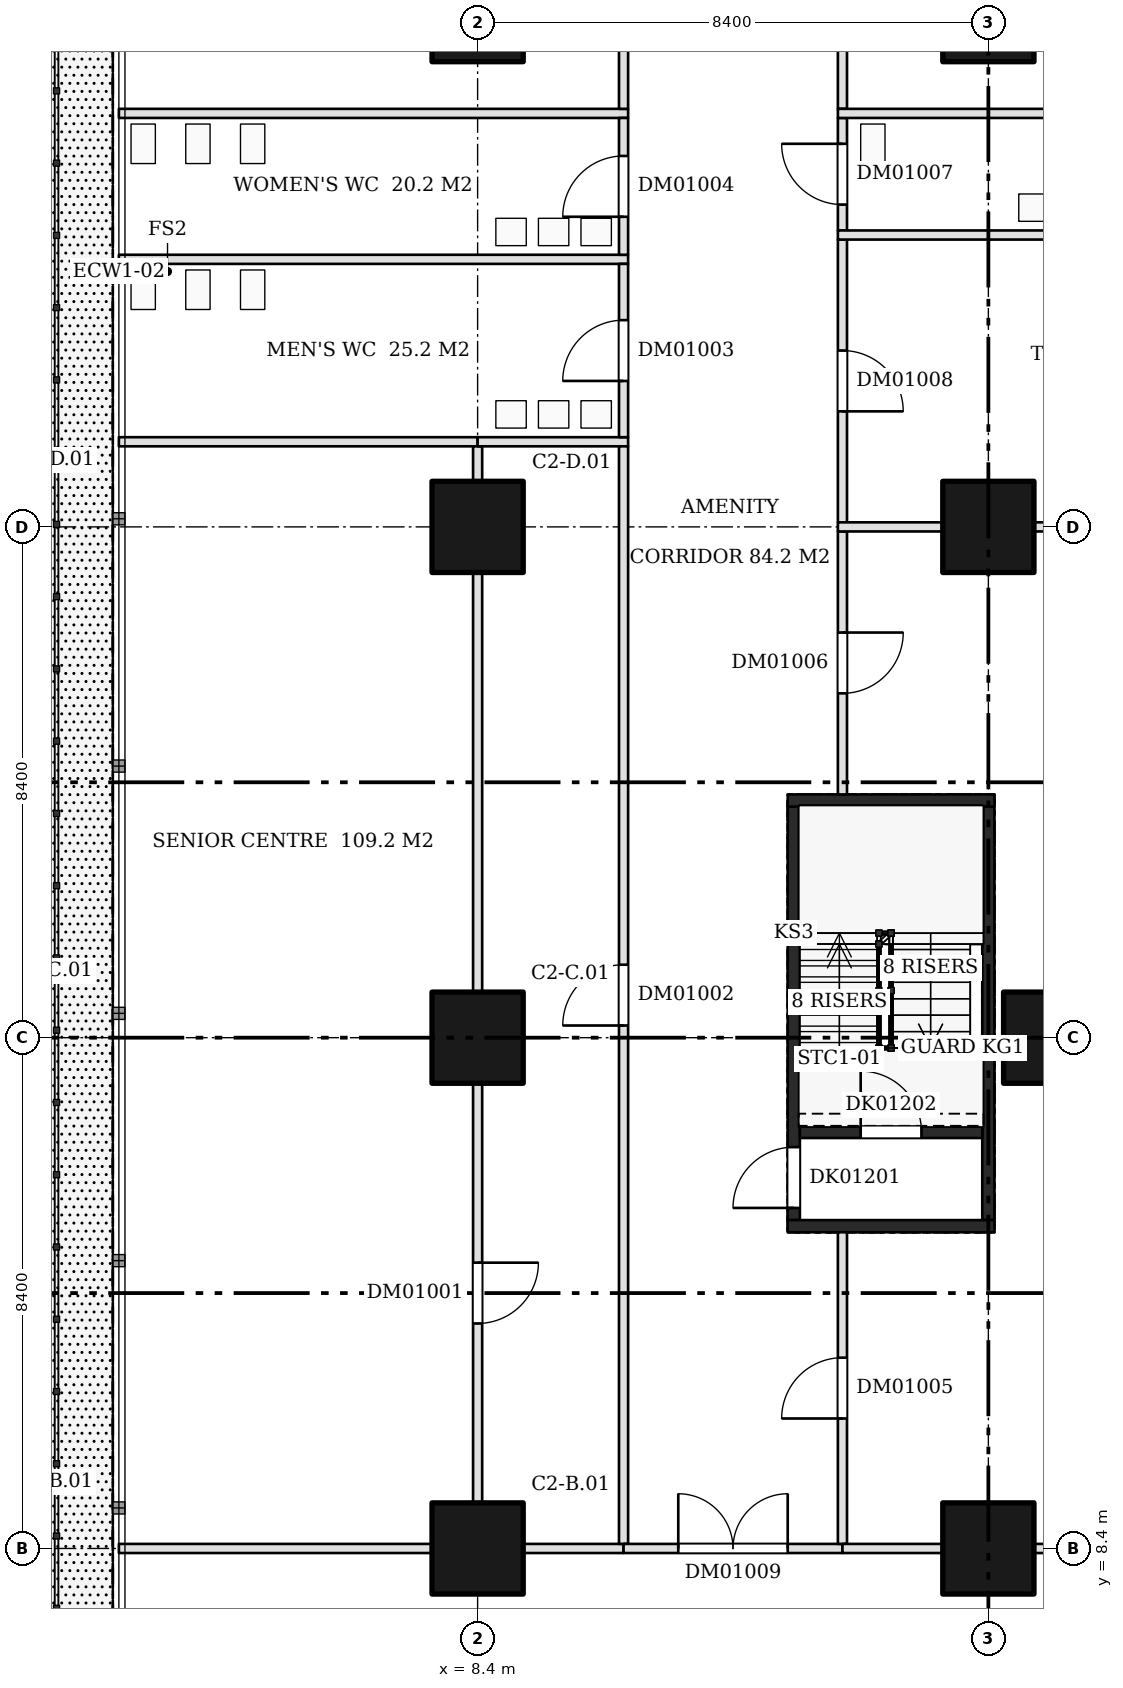
"""IFC4 building model, lengths in metres.
Left out: names, types, materials, properties, quantities, classifications, styles, units other than length and angle.
Written with IfcOpenShell. Run it as: python <this file> out.ifc"""

import sys

from ifc_helpers import new_model, si_unit, direction, frame, frame_2d, origin, origin_2d, place, context, subcontext, project, spatial, rectangle, extrude, element, fill, save


model = new_model("IFC4")
c1 = context("Model", 3, precision=1e-05, world=origin(), true_north=direction((0.0, 1.0)))
c2 = subcontext(c1, "Body", "Model", "MODEL_VIEW")
j1 = project(units=[si_unit("LENGTHUNIT", "METRE"), si_unit("PLANEANGLEUNIT", "RADIAN")], contexts=[c1])
p1 = place(None, origin())
s1 = spatial("IfcSite", under=j1, at=p1, CompositionType="ELEMENT")
p2 = place(p1, origin())
s2 = spatial("IfcBuilding", under=s1, at=p2, CompositionType="ELEMENT")
p3 = place(p2, frame((0.0, 0.0, 9.0)))
s3 = spatial("IfcBuildingStorey", under=s2, at=p3, CompositionType="ELEMENT", Elevation=9.0)
for number, where, z_axis, x_axis in (
    (1, (8.4, 8.4, 0.0), (0.0, 0.0, 1.0), (1.0, 0.0, 0.0)),
    (2, (8.4, 16.8, 0.0), (0.0, 0.0, 1.0), (1.0, 0.0, 0.0)),
    (3, (8.4, 25.2, 0.0), (0.0, 0.0, 1.0), (1.0, 0.0, 0.0)),
    (4, (8.4, 33.6, 0.0), (0.0, 0.0, 1.0), (1.0, 0.0, 0.0)),
    (5, (16.8, 8.4, 0.0), (0.0, 0.0, 1.0), (1.0, 0.0, 0.0)),
    (6, (17.8, 16.8, 0.0), (0.0, 0.0, 1.0), (1.0, 0.0, 0.0)),
    (7, (16.8, 25.2, 0.0), (0.0, 0.0, 1.0), (1.0, 0.0, 0.0)),
    (8, (16.8, 33.6, 0.0), (0.0, 0.0, 1.0), (1.0, 0.0, 0.0)),
):
    element("IfcColumn", number, at=place(p3, frame(where, z_axis=z_axis, x_axis=x_axis)), inside=s3, PredefinedType="COLUMN", context=c2, shape_type="SweptSolid", body=[
        extrude(rectangle(XDim=1.5, YDim=1.5, at=origin_2d()), origin(), (0.0, 0.0, 1.0), 4.95),
    ])
p4 = place(p3, frame((13.6, 13.8, 0.0), z_axis=(0.0, 0.0, 1.0), x_axis=(0.0, 1.0, 0.0)))
e9 = element("IfcWall", 9, at=p4, inside=s3, PredefinedType="SHEAR", context=c2, shape_type="SweptSolid", body=[
    extrude(rectangle(XDim=6.8, YDim=0.2, at=frame_2d((3.4, 0.0))), origin(), (0.0, 0.0, 1.0), 4.98),
])
p5 = place(p4, frame((0.2, 0.0, 0.0)))
e10 = element("IfcOpeningElement", 10, at=p5, cuts=e9, PredefinedType="OPENING", context=c2, shape_type="SweptSolid", body=[
    extrude(rectangle(XDim=1.0, YDim=2.1, at=frame_2d((0.5, 1.05))), frame((0.0, 0.11, 0.0), z_axis=(0.0, -1.0, 0.0), x_axis=(1.0, 0.0, 0.0)), (0.0, 0.0, 1.0), 0.22),
])
p6 = place(p3, frame((16.8, 13.8, 0.0), z_axis=(0.0, 0.0, 1.0), x_axis=(0.0, 1.0, 0.0)))
e11 = element("IfcWall", 11, at=p6, inside=s3, PredefinedType="SHEAR", context=c2, shape_type="SweptSolid", body=[
    extrude(rectangle(XDim=6.8, YDim=0.2, at=frame_2d((3.4, 0.0))), origin(), (0.0, 0.0, 1.0), 4.98),
])
for number, where, z_axis, x_axis in (
    (12, (13.5, 13.7, 0.0), (0.0, 0.0, 1.0), (1.0, 0.0, 0.0)),
    (13, (13.5, 20.7, 0.0), (0.0, 0.0, 1.0), (1.0, 0.0, 0.0)),
):
    element("IfcWall", number, at=place(p3, frame(where, z_axis=z_axis, x_axis=x_axis)), inside=s3, PredefinedType="SHEAR", context=c2, shape_type="SweptSolid", body=[
        extrude(rectangle(XDim=3.4, YDim=0.2, at=frame_2d((1.7, 0.0))), origin(), (0.0, 0.0, 1.0), 4.98),
    ])
p7 = place(p3, frame((13.7, 15.25, 0.0), z_axis=(0.0, 0.0, 1.0), x_axis=(1.0, 0.0, 0.0)))
e14 = element("IfcWall", 14, at=p7, inside=s3, PredefinedType="SHEAR", context=c2, shape_type="SweptSolid", body=[
    extrude(rectangle(XDim=3.0, YDim=0.2, at=frame_2d((1.5, 0.0))), origin(), (0.0, 0.0, 1.0), 4.98),
])
p8 = place(p7, frame((1.0, 0.0, 0.0)))
e15 = element("IfcOpeningElement", 15, at=p8, cuts=e14, PredefinedType="OPENING", context=c2, shape_type="SweptSolid", body=[
    extrude(rectangle(XDim=1.0, YDim=2.1, at=frame_2d((0.5, 1.05))), frame((0.0, 0.11, 0.0), z_axis=(0.0, -1.0, 0.0), x_axis=(1.0, 0.0, 0.0)), (0.0, 0.0, 1.0), 0.22),
])
p9 = place(p3, frame((2.5, 8.4, 0.0), z_axis=(0.0, 0.0, 1.0), x_axis=(1.0, 0.0, 0.0)))
e16 = element("IfcWall", 16, at=p9, inside=s3, PredefinedType="PARTITIONING", context=c2, shape_type="SweptSolid", body=[
    extrude(rectangle(XDim=5.15, YDim=0.15, at=frame_2d((2.575, 0.0))), origin(), (0.0, 0.0, 1.0), 4.95),
])
p10 = place(p3, frame((2.5, 26.6, 0.0), z_axis=(0.0, 0.0, 1.0), x_axis=(1.0, 0.0, 0.0)))
e17 = element("IfcWall", 17, at=p10, inside=s3, PredefinedType="PARTITIONING", context=c2, shape_type="SweptSolid", body=[
    extrude(rectangle(XDim=5.9, YDim=0.15, at=frame_2d((2.95, 0.0))), origin(), (0.0, 0.0, 1.0), 4.95),
])
for number, where, z_axis, x_axis in (
    (18, (2.5, 29.6, 0.0), (0.0, 0.0, 1.0), (1.0, 0.0, 0.0)),
    (19, (2.5, 32.0, 0.0), (0.0, 0.0, 1.0), (1.0, 0.0, 0.0)),
):
    element("IfcWall", number, at=place(p3, frame(where, z_axis=z_axis, x_axis=x_axis)), inside=s3, PredefinedType="PARTITIONING", context=c2, shape_type="SweptSolid", body=[
        extrude(rectangle(XDim=8.375, YDim=0.15, at=frame_2d((4.188, 0.0))), origin(), (0.0, 0.0, 1.0), 4.95),
    ])
p11 = place(p3, frame((8.4, 9.15, 0.0), z_axis=(0.0, 0.0, 1.0), x_axis=(0.0, 1.0, 0.0)))
e20 = element("IfcWall", 20, at=p11, inside=s3, PredefinedType="PARTITIONING", context=c2, shape_type="SweptSolid", body=[
    extrude(rectangle(XDim=6.9, YDim=0.15, at=frame_2d((3.45, 0.0))), origin(), (0.0, 0.0, 1.0), 4.95),
])
p12 = place(p11, frame((2.95, 0.0, 0.0)))
e21 = element("IfcOpeningElement", 21, at=p12, cuts=e20, PredefinedType="OPENING", context=c2, shape_type="SweptSolid", body=[
    extrude(rectangle(XDim=1.0, YDim=2.1, at=frame_2d((0.5, 1.05))), frame((0.0, 0.085, 0.0), z_axis=(0.0, -1.0, 0.0), x_axis=(1.0, 0.0, 0.0)), (0.0, 0.0, 1.0), 0.17),
])
p13 = place(p3, frame((8.4, 17.55, 0.0), z_axis=(0.0, 0.0, 1.0), x_axis=(0.0, 1.0, 0.0)))
e22 = element("IfcWall", 22, at=p13, inside=s3, PredefinedType="PARTITIONING", context=c2, shape_type="SweptSolid", body=[
    extrude(rectangle(XDim=6.9, YDim=0.15, at=frame_2d((3.45, 0.0))), origin(), (0.0, 0.0, 1.0), 4.95),
])
p14 = place(p3, frame((8.4, 25.95, 0.0), z_axis=(0.0, 0.0, 1.0), x_axis=(0.0, 1.0, 0.0)))
e23 = element("IfcWall", 23, at=p14, inside=s3, PredefinedType="PARTITIONING", context=c2, shape_type="SweptSolid", body=[
    extrude(rectangle(XDim=0.575, YDim=0.15, at=frame_2d((0.288, 0.0))), origin(), (0.0, 0.0, 1.0), 4.95),
])
p15 = place(p3, frame((9.15, 8.4, 0.0), z_axis=(0.0, 0.0, 1.0), x_axis=(1.0, 0.0, 0.0)))
e24 = element("IfcWall", 24, at=p15, inside=s3, PredefinedType="PARTITIONING", context=c2, shape_type="SweptSolid", body=[
    extrude(rectangle(XDim=1.65, YDim=0.15, at=frame_2d((0.825, 0.0))), origin(), (0.0, 0.0, 1.0), 4.95),
])
p16 = place(p3, frame((8.4, 26.6, 0.0), z_axis=(0.0, 0.0, 1.0), x_axis=(1.0, 0.0, 0.0)))
e25 = element("IfcWall", 25, at=p16, inside=s3, PredefinedType="PARTITIONING", context=c2, shape_type="SweptSolid", body=[
    extrude(rectangle(XDim=2.475, YDim=0.15, at=frame_2d((1.238, 0.0))), origin(), (0.0, 0.0, 1.0), 4.95),
])
p17 = place(p3, frame((10.8, 8.475, 0.0), z_axis=(0.0, 0.0, 1.0), x_axis=(0.0, 1.0, 0.0)))
e26 = element("IfcWall", 26, at=p17, inside=s3, PredefinedType="PARTITIONING", context=c2, shape_type="SweptSolid", body=[
    extrude(rectangle(XDim=18.05, YDim=0.15, at=frame_2d((9.025, 0.0))), origin(), (0.0, 0.0, 1.0), 4.95),
])
p18 = place(p17, frame((8.525, 0.0, 0.0)))
e27 = element("IfcOpeningElement", 27, at=p18, cuts=e26, PredefinedType="OPENING", context=c2, shape_type="SweptSolid", body=[
    extrude(rectangle(XDim=1.0, YDim=2.1, at=frame_2d((0.5, 1.05))), frame((0.0, 0.085, 0.0), z_axis=(0.0, -1.0, 0.0), x_axis=(1.0, 0.0, 0.0)), (0.0, 0.0, 1.0), 0.17),
])
p19 = place(p3, frame((10.8, 8.4, 0.0), z_axis=(0.0, 0.0, 1.0), x_axis=(1.0, 0.0, 0.0)))
e28 = element("IfcWall", 28, at=p19, inside=s3, PredefinedType="PARTITIONING", context=c2, shape_type="SweptSolid", body=[
    extrude(rectangle(XDim=3.6, YDim=0.15, at=frame_2d((1.8, 0.0))), origin(), (0.0, 0.0, 1.0), 4.95),
])
p20 = place(p19, frame((0.9, 0.0, 0.0)))
e29 = element("IfcOpeningElement", 29, at=p20, cuts=e28, PredefinedType="OPENING", context=c2, shape_type="SweptSolid", body=[
    extrude(rectangle(XDim=1.8, YDim=2.1, at=frame_2d((0.9, 1.05))), frame((0.0, 0.085, 0.0), z_axis=(0.0, -1.0, 0.0), x_axis=(1.0, 0.0, 0.0)), (0.0, 0.0, 1.0), 0.17),
])
p21 = place(p3, frame((10.8, 26.675, 0.0), z_axis=(0.0, 0.0, 1.0), x_axis=(0.0, 1.0, 0.0)))
e30 = element("IfcWall", 30, at=p21, inside=s3, PredefinedType="PARTITIONING", context=c2, shape_type="SweptSolid", body=[
    extrude(rectangle(XDim=2.85, YDim=0.15, at=frame_2d((1.425, 0.0))), origin(), (0.0, 0.0, 1.0), 4.95),
])
p22 = place(p21, frame((0.925, 0.0, 0.0)))
e31 = element("IfcOpeningElement", 31, at=p22, cuts=e30, PredefinedType="OPENING", context=c2, shape_type="SweptSolid", body=[
    extrude(rectangle(XDim=1.0, YDim=2.1, at=frame_2d((0.5, 1.05))), frame((0.0, 0.085, 0.0), z_axis=(0.0, -1.0, 0.0), x_axis=(1.0, 0.0, 0.0)), (0.0, 0.0, 1.0), 0.17),
])
p23 = place(p3, frame((10.8, 29.675, 0.0), z_axis=(0.0, 0.0, 1.0), x_axis=(0.0, 1.0, 0.0)))
e32 = element("IfcWall", 32, at=p23, inside=s3, PredefinedType="PARTITIONING", context=c2, shape_type="SweptSolid", body=[
    extrude(rectangle(XDim=2.25, YDim=0.15, at=frame_2d((1.125, 0.0))), origin(), (0.0, 0.0, 1.0), 4.95),
])
p24 = place(p23, frame((0.625, 0.0, 0.0)))
e33 = element("IfcOpeningElement", 33, at=p24, cuts=e32, PredefinedType="OPENING", context=c2, shape_type="SweptSolid", body=[
    extrude(rectangle(XDim=1.0, YDim=2.1, at=frame_2d((0.5, 1.05))), frame((0.0, 0.085, 0.0), z_axis=(0.0, -1.0, 0.0), x_axis=(1.0, 0.0, 0.0)), (0.0, 0.0, 1.0), 0.17),
])
p25 = place(p3, frame((10.8, 32.075, 0.0), z_axis=(0.0, 0.0, 1.0), x_axis=(0.0, 1.0, 0.0)))
e34 = element("IfcWall", 34, at=p25, inside=s3, PredefinedType="PARTITIONING", context=c2, shape_type="SweptSolid", body=[
    extrude(rectangle(XDim=1.45, YDim=0.15, at=frame_2d((0.725, 0.0))), origin(), (0.0, 0.0, 1.0), 4.95),
])
p26 = place(p3, frame((14.4, 8.475, 0.0), z_axis=(0.0, 0.0, 1.0), x_axis=(0.0, 1.0, 0.0)))
e35 = element("IfcWall", 35, at=p26, inside=s3, PredefinedType="PARTITIONING", context=c2, shape_type="SweptSolid", body=[
    extrude(rectangle(XDim=5.125, YDim=0.15, at=frame_2d((2.562, 0.0))), origin(), (0.0, 0.0, 1.0), 4.95),
])
p27 = place(p26, frame((2.062, 0.0, 0.0)))
e36 = element("IfcOpeningElement", 36, at=p27, cuts=e35, PredefinedType="OPENING", context=c2, shape_type="SweptSolid", body=[
    extrude(rectangle(XDim=1.0, YDim=2.1, at=frame_2d((0.5, 1.05))), frame((0.0, 0.085, 0.0), z_axis=(0.0, -1.0, 0.0), x_axis=(1.0, 0.0, 0.0)), (0.0, 0.0, 1.0), 0.17),
])
p28 = place(p3, frame((14.4, 8.4, 0.0), z_axis=(0.0, 0.0, 1.0), x_axis=(1.0, 0.0, 0.0)))
e37 = element("IfcWall", 37, at=p28, inside=s3, PredefinedType="PARTITIONING", context=c2, shape_type="SweptSolid", body=[
    extrude(rectangle(XDim=1.65, YDim=0.15, at=frame_2d((0.825, 0.0))), origin(), (0.0, 0.0, 1.0), 4.95),
])
p29 = place(p3, frame((17.55, 8.4, 0.0), z_axis=(0.0, 0.0, 1.0), x_axis=(1.0, 0.0, 0.0)))
e38 = element("IfcWall", 38, at=p29, inside=s3, PredefinedType="PARTITIONING", context=c2, shape_type="SweptSolid", body=[
    extrude(rectangle(XDim=7.55, YDim=0.15, at=frame_2d((3.775, 0.0))), origin(), (0.0, 0.0, 1.0), 4.95),
])
p30 = place(p3, frame((14.4, 20.8, 0.0), z_axis=(0.0, 0.0, 1.0), x_axis=(0.0, 1.0, 0.0)))
e39 = element("IfcWall", 39, at=p30, inside=s3, PredefinedType="PARTITIONING", context=c2, shape_type="SweptSolid", body=[
    extrude(rectangle(XDim=4.325, YDim=0.15, at=frame_2d((2.163, 0.0))), origin(), (0.0, 0.0, 1.0), 4.95),
])
p31 = place(p30, frame((1.663, 0.0, 0.0)))
e40 = element("IfcOpeningElement", 40, at=p31, cuts=e39, PredefinedType="OPENING", context=c2, shape_type="SweptSolid", body=[
    extrude(rectangle(XDim=1.0, YDim=2.1, at=frame_2d((0.5, 1.05))), frame((0.0, 0.085, 0.0), z_axis=(0.0, -1.0, 0.0), x_axis=(1.0, 0.0, 0.0)), (0.0, 0.0, 1.0), 0.17),
])
p32 = place(p3, frame((14.4, 25.275, 0.0), z_axis=(0.0, 0.0, 1.0), x_axis=(0.0, 1.0, 0.0)))
e41 = element("IfcWall", 41, at=p32, inside=s3, PredefinedType="PARTITIONING", context=c2, shape_type="SweptSolid", body=[
    extrude(rectangle(XDim=4.65, YDim=0.15, at=frame_2d((2.325, 0.0))), origin(), (0.0, 0.0, 1.0), 4.95),
])
p33 = place(p32, frame((1.825, 0.0, 0.0)))
e42 = element("IfcOpeningElement", 42, at=p33, cuts=e41, PredefinedType="OPENING", context=c2, shape_type="SweptSolid", body=[
    extrude(rectangle(XDim=1.0, YDim=2.1, at=frame_2d((0.5, 1.05))), frame((0.0, 0.085, 0.0), z_axis=(0.0, -1.0, 0.0), x_axis=(1.0, 0.0, 0.0)), (0.0, 0.0, 1.0), 0.17),
])
p34 = place(p3, frame((14.325, 25.2, 0.0), z_axis=(0.0, 0.0, 1.0), x_axis=(1.0, 0.0, 0.0)))
e43 = element("IfcWall", 43, at=p34, inside=s3, PredefinedType="PARTITIONING", context=c2, shape_type="SweptSolid", body=[
    extrude(rectangle(XDim=1.725, YDim=0.15, at=frame_2d((0.863, 0.0))), origin(), (0.0, 0.0, 1.0), 4.95),
])
p35 = place(p3, frame((17.55, 25.2, 0.0), z_axis=(0.0, 0.0, 1.0), x_axis=(1.0, 0.0, 0.0)))
e44 = element("IfcWall", 44, at=p35, inside=s3, PredefinedType="PARTITIONING", context=c2, shape_type="SweptSolid", body=[
    extrude(rectangle(XDim=5.15, YDim=0.15, at=frame_2d((2.575, 0.0))), origin(), (0.0, 0.0, 1.0), 4.95),
])
p36 = place(p3, frame((14.4, 30.075, 0.0), z_axis=(0.0, 0.0, 1.0), x_axis=(0.0, 1.0, 0.0)))
e45 = element("IfcWall", 45, at=p36, inside=s3, PredefinedType="PARTITIONING", context=c2, shape_type="SweptSolid", body=[
    extrude(rectangle(XDim=1.85, YDim=0.15, at=frame_2d((0.925, 0.0))), origin(), (0.0, 0.0, 1.0), 4.95),
])
p37 = place(p36, frame((0.425, 0.0, 0.0)))
e46 = element("IfcOpeningElement", 46, at=p37, cuts=e45, PredefinedType="OPENING", context=c2, shape_type="SweptSolid", body=[
    extrude(rectangle(XDim=1.0, YDim=2.1, at=frame_2d((0.5, 1.05))), frame((0.0, 0.085, 0.0), z_axis=(0.0, -1.0, 0.0), x_axis=(1.0, 0.0, 0.0)), (0.0, 0.0, 1.0), 0.17),
])
p38 = place(p3, frame((14.325, 30.0, 0.0), z_axis=(0.0, 0.0, 1.0), x_axis=(1.0, 0.0, 0.0)))
e47 = element("IfcWall", 47, at=p38, inside=s3, PredefinedType="PARTITIONING", context=c2, shape_type="SweptSolid", body=[
    extrude(rectangle(XDim=3.75, YDim=0.15, at=frame_2d((1.875, 0.0))), origin(), (0.0, 0.0, 1.0), 4.95),
])
p39 = place(p3, frame((14.4, 32.075, 0.0), z_axis=(0.0, 0.0, 1.0), x_axis=(0.0, 1.0, 0.0)))
e48 = element("IfcWall", 48, at=p39, inside=s3, PredefinedType="PARTITIONING", context=c2, shape_type="SweptSolid", body=[
    extrude(rectangle(XDim=1.45, YDim=0.15, at=frame_2d((0.725, 0.0))), origin(), (0.0, 0.0, 1.0), 4.95),
])
p40 = place(p3, frame((14.325, 32.0, 0.0), z_axis=(0.0, 0.0, 1.0), x_axis=(1.0, 0.0, 0.0)))
e49 = element("IfcWall", 49, at=p40, inside=s3, PredefinedType="PARTITIONING", context=c2, shape_type="SweptSolid", body=[
    extrude(rectangle(XDim=3.75, YDim=0.15, at=frame_2d((1.875, 0.0))), origin(), (0.0, 0.0, 1.0), 4.95),
])
p41 = place(p5, origin())
e50 = element("IfcDoor", 50, at=p41, inside=s3, OperationType="SINGLE_SWING_LEFT", PredefinedType="DOOR", context=c2, shape_type="SweptSolid", body=[
    extrude(rectangle(XDim=1.0, YDim=2.1, at=frame_2d((0.5, 1.05))), frame((0.0, 0.025, 0.0), z_axis=(0.0, -1.0, 0.0), x_axis=(1.0, 0.0, 0.0)), (0.0, 0.0, 1.0), 0.05),
])
fill(e10, e50)
p42 = place(p8, origin())
e51 = element("IfcDoor", 51, at=p42, inside=s3, OperationType="SINGLE_SWING_LEFT", PredefinedType="DOOR", context=c2, shape_type="SweptSolid", body=[
    extrude(rectangle(XDim=1.0, YDim=2.1, at=frame_2d((0.5, 1.05))), frame((0.0, 0.025, 0.0), z_axis=(0.0, -1.0, 0.0), x_axis=(1.0, 0.0, 0.0)), (0.0, 0.0, 1.0), 0.05),
])
fill(e15, e51)
p43 = place(p12, frame((1.0, 0.0, 0.0), z_axis=(0.0, 0.0, 1.0), x_axis=(-1.0, 0.0, 0.0)))
e52 = element("IfcDoor", 52, at=p43, inside=s3, OperationType="SINGLE_SWING_LEFT", PredefinedType="DOOR", context=c2, shape_type="SweptSolid", body=[
    extrude(rectangle(XDim=1.0, YDim=2.1, at=frame_2d((0.5, 1.05))), frame((0.0, 0.025, 0.0), z_axis=(0.0, -1.0, 0.0), x_axis=(1.0, 0.0, 0.0)), (0.0, 0.0, 1.0), 0.05),
])
fill(e21, e52)
p44 = place(p18, origin())
e53 = element("IfcDoor", 53, at=p44, inside=s3, OperationType="SINGLE_SWING_LEFT", PredefinedType="DOOR", context=c2, shape_type="SweptSolid", body=[
    extrude(rectangle(XDim=1.0, YDim=2.1, at=frame_2d((0.5, 1.05))), frame((0.0, 0.025, 0.0), z_axis=(0.0, -1.0, 0.0), x_axis=(1.0, 0.0, 0.0)), (0.0, 0.0, 1.0), 0.05),
])
fill(e27, e53)
p45 = place(p22, origin())
e54 = element("IfcDoor", 54, at=p45, inside=s3, OperationType="SINGLE_SWING_LEFT", PredefinedType="DOOR", context=c2, shape_type="SweptSolid", body=[
    extrude(rectangle(XDim=1.0, YDim=2.1, at=frame_2d((0.5, 1.05))), frame((0.0, 0.025, 0.0), z_axis=(0.0, -1.0, 0.0), x_axis=(1.0, 0.0, 0.0)), (0.0, 0.0, 1.0), 0.05),
])
fill(e31, e54)
p46 = place(p24, origin())
e55 = element("IfcDoor", 55, at=p46, inside=s3, OperationType="SINGLE_SWING_LEFT", PredefinedType="DOOR", context=c2, shape_type="SweptSolid", body=[
    extrude(rectangle(XDim=1.0, YDim=2.1, at=frame_2d((0.5, 1.05))), frame((0.0, 0.025, 0.0), z_axis=(0.0, -1.0, 0.0), x_axis=(1.0, 0.0, 0.0)), (0.0, 0.0, 1.0), 0.05),
])
fill(e33, e55)
p47 = place(p27, origin())
e56 = element("IfcDoor", 56, at=p47, inside=s3, OperationType="SINGLE_SWING_LEFT", PredefinedType="DOOR", context=c2, shape_type="SweptSolid", body=[
    extrude(rectangle(XDim=1.0, YDim=2.1, at=frame_2d((0.5, 1.05))), frame((0.0, 0.025, 0.0), z_axis=(0.0, -1.0, 0.0), x_axis=(1.0, 0.0, 0.0)), (0.0, 0.0, 1.0), 0.05),
])
fill(e36, e56)
p48 = place(p31, frame((1.0, 0.0, 0.0), z_axis=(0.0, 0.0, 1.0), x_axis=(-1.0, 0.0, 0.0)))
e57 = element("IfcDoor", 57, at=p48, inside=s3, OperationType="SINGLE_SWING_LEFT", PredefinedType="DOOR", context=c2, shape_type="SweptSolid", body=[
    extrude(rectangle(XDim=1.0, YDim=2.1, at=frame_2d((0.5, 1.05))), frame((0.0, 0.025, 0.0), z_axis=(0.0, -1.0, 0.0), x_axis=(1.0, 0.0, 0.0)), (0.0, 0.0, 1.0), 0.05),
])
fill(e40, e57)
p49 = place(p37, origin())
e58 = element("IfcDoor", 58, at=p49, inside=s3, OperationType="SINGLE_SWING_RIGHT", PredefinedType="DOOR", context=c2, shape_type="SweptSolid", body=[
    extrude(rectangle(XDim=1.0, YDim=2.1, at=frame_2d((0.5, 1.05))), frame((0.0, 0.025, 0.0), z_axis=(0.0, -1.0, 0.0), x_axis=(1.0, 0.0, 0.0)), (0.0, 0.0, 1.0), 0.05),
])
fill(e46, e58)
p50 = place(p33, frame((1.0, 0.0, 0.0), z_axis=(0.0, 0.0, 1.0), x_axis=(-1.0, 0.0, 0.0)))
e59 = element("IfcDoor", 59, at=p50, inside=s3, OperationType="SINGLE_SWING_RIGHT", PredefinedType="DOOR", context=c2, shape_type="SweptSolid", body=[
    extrude(rectangle(XDim=1.0, YDim=2.1, at=frame_2d((0.5, 1.05))), frame((0.0, 0.025, 0.0), z_axis=(0.0, -1.0, 0.0), x_axis=(1.0, 0.0, 0.0)), (0.0, 0.0, 1.0), 0.05),
])
fill(e42, e59)
p51 = place(p20, origin())
e60 = element("IfcDoor", 60, at=p51, inside=s3, OperationType="DOUBLE_DOOR_SINGLE_SWING", PredefinedType="DOOR", context=c2, shape_type="SweptSolid", body=[
    extrude(rectangle(XDim=1.8, YDim=2.1, at=frame_2d((0.9, 1.05))), frame((0.0, 0.025, 0.0), z_axis=(0.0, -1.0, 0.0), x_axis=(1.0, 0.0, 0.0)), (0.0, 0.0, 1.0), 0.05),
])
fill(e29, e60)
save(model, sys.argv[1])
